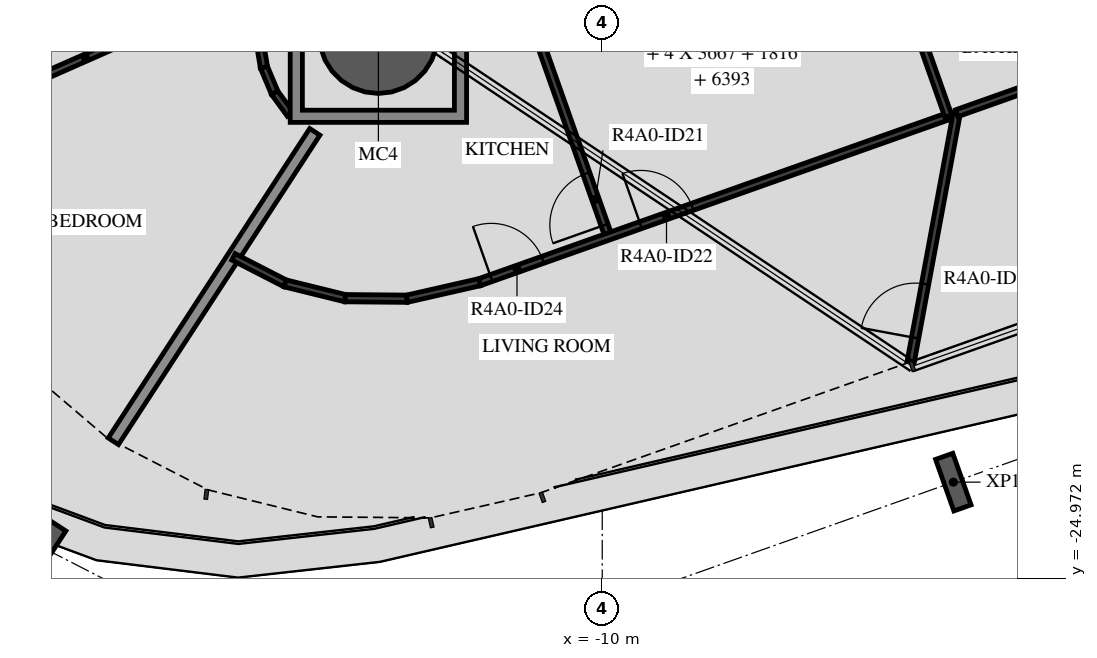
"""IFC4 building model, lengths in metres.
Left out: names, types, materials, properties, quantities, classifications, styles, units other than length and angle.
Written with IfcOpenShell. Run it as: python <this file> out.ifc"""

import sys

from ifc_helpers import new_model, si_unit, direction, frame, frame_2d, origin, origin_2d, place, context, subcontext, project, spatial, polyline, rectangle, hollow_circle, i_section, outline, extrude, element, fill, save


model = new_model("IFC4")
c1 = context("Model", 3, precision=1e-05, world=origin(), true_north=direction((0.0, 1.0)))
c2 = subcontext(c1, "Body", "Model", "MODEL_VIEW")
j1 = project(units=[si_unit("LENGTHUNIT", "METRE"), si_unit("PLANEANGLEUNIT", "RADIAN")], contexts=[c1])
p1 = place(None, origin())
s1 = spatial("IfcSite", under=j1, at=p1, CompositionType="ELEMENT")
p2 = place(p1, origin())
s2 = spatial("IfcBuilding", under=s1, at=p2, CompositionType="ELEMENT")
p3 = place(p2, frame((0.0, 0.0, 151.7)))
s3 = spatial("IfcBuildingStorey", under=s2, at=p3, CompositionType="ELEMENT", Elevation=151.7)
p4 = place(p3, frame((-13.681, -16.019, -0.45), z_axis=(0.0, 0.0, 1.0), x_axis=(1.0, 0.0, 0.0)))
e1 = element("IfcColumn", 1, at=p4, inside=s3, PredefinedType="COLUMN", context=c2, shape_type="SweptSolid", body=[
    extrude(hollow_circle(Radius=0.975, WallThickness=0.045, at=origin_2d()), origin(), (0.0, 0.0, 1.0), 3.57),
])
for number, where, z_axis, x_axis in (
    (2, (-19.192, -24.483, -0.45), (0.0, 0.0, 1.0), (-0.838, 0.546, 0.0)),
    (3, (-4.226, -23.385, -0.45), (0.0, 0.0, 1.0), (-0.943, -0.334, 0.0)),
):
    element("IfcColumn", number, at=place(p3, frame(where, z_axis=z_axis, x_axis=x_axis)), inside=s3, PredefinedType="COLUMN", context=c2, shape_type="SweptSolid", body=[
        extrude(i_section(OverallWidth=0.3, OverallDepth=0.9, WebThickness=0.019, FlangeThickness=0.035, FilletRadius=0.03, at=origin_2d()), origin(), (0.0, 0.0, 1.0), 3.57),
    ])
p5 = place(p3, frame((-18.04, -22.713, 0.0), z_axis=(0.0, 0.0, 1.0), x_axis=(0.545629831617, 0.83802630439, 0.0)))
e4 = element("IfcWall", 4, at=p5, inside=s3, PredefinedType="STANDARD", context=c2, shape_type="SweptSolid", body=[
    extrude(rectangle(XDim=6.072, YDim=0.2, at=frame_2d((3.036, 0.0))), origin(), (0.0, 0.0, 1.0), 2.73),
])
p6 = place(p3, frame((-21.455, -17.71, 0.0), z_axis=(0.0, 0.0, 1.0), x_axis=(0.914829518237, 0.403840256243, 0.0)))
e5 = element("IfcWall", 5, at=p6, inside=s3, PredefinedType="PARTITIONING", context=c2, shape_type="SweptSolid", body=[
    extrude(rectangle(XDim=6.459, YDim=0.12, at=frame_2d((3.23, 0.0))), origin(), (0.0, 0.0, 1.0), 2.73),
])
p7 = place(p6, frame((0.2, 0.0, 0.0)))
e6 = element("IfcOpeningElement", 6, at=p7, cuts=e5, PredefinedType="OPENING", context=c2, shape_type="SweptSolid", body=[
    extrude(rectangle(XDim=0.9, YDim=2.1, at=frame_2d((0.45, 1.05))), frame((0.0, 0.07, 0.0), z_axis=(0.0, -1.0, 0.0), x_axis=(1.0, 0.0, 0.0)), (0.0, 0.0, 1.0), 0.14),
])
for number, where, z_axis, x_axis in (
    (7, (-15.638, -16.115, 0.0), (0.0, 0.0, 1.0), (0.165, -0.986, 0.0)),
    (8, (-15.563, -16.564, 0.0), (0.0, 0.0, 1.0), (0.389, -0.921, 0.0)),
):
    element("IfcWall", number, at=place(p3, frame(where, z_axis=z_axis, x_axis=x_axis)), inside=s3, PredefinedType="PARTITIONING", context=c2, shape_type="SweptSolid", body=[
        extrude(rectangle(XDim=0.455, YDim=0.12, at=frame_2d((0.228, 0.0))), origin(), (0.0, 0.0, 1.0), 3.12),
    ])
p8 = place(p3, frame((-15.386, -16.983, 0.0), z_axis=(0.0, 0.0, 1.0), x_axis=(0.590016589342, -0.807391122258, 0.0)))
e9 = element("IfcWall", 9, at=p8, inside=s3, PredefinedType="PARTITIONING", context=c2, shape_type="SweptSolid", body=[
    extrude(rectangle(XDim=0.432, YDim=0.12, at=frame_2d((0.216, 0.0))), origin(), (0.0, 0.0, 1.0), 3.12),
])
p9 = place(p3, frame((-9.895, -19.346, 0.0), z_axis=(0.0, 0.0, 1.0), x_axis=(-0.333781129158, 0.942650602195, 0.0)))
e10 = element("IfcWall", 10, at=p9, inside=s3, PredefinedType="PARTITIONING", context=c2, shape_type="SweptSolid", body=[
    extrude(rectangle(XDim=5.819, YDim=0.12, at=frame_2d((2.91, 0.0))), origin(), (0.0, 0.0, 1.0), 3.12),
])
p10 = place(p9, frame((0.2, 0.0, 0.0)))
e11 = element("IfcOpeningElement", 11, at=p10, cuts=e10, PredefinedType="OPENING", context=c2, shape_type="SweptSolid", body=[
    extrude(rectangle(XDim=0.9, YDim=2.1, at=frame_2d((0.45, 1.05))), frame((0.0, 0.07, 0.0), z_axis=(0.0, -1.0, 0.0), x_axis=(1.0, 0.0, 0.0)), (0.0, 0.0, 1.0), 0.14),
])
p11 = place(p3, frame((-16.065, -19.68, 0.0), z_axis=(0.0, 0.0, 1.0), x_axis=(0.889684645268, -0.456575549033, 0.0)))
e12 = element("IfcWall", 12, at=p11, inside=s3, PredefinedType="PARTITIONING", context=c2, shape_type="SweptSolid", body=[
    extrude(rectangle(XDim=0.957, YDim=0.12, at=frame_2d((0.479, 0.0))), origin(), (0.0, 0.0, 1.0), 3.12),
])
p12 = place(p3, frame((-15.214, -20.117, 0.0), z_axis=(0.0, 0.0, 1.0), x_axis=(0.970998575146, -0.239085271534, 0.0)))
e13 = element("IfcWall", 13, at=p12, inside=s3, PredefinedType="PARTITIONING", context=c2, shape_type="SweptSolid", body=[
    extrude(rectangle(XDim=1.016, YDim=0.12, at=frame_2d((0.508, 0.0))), origin(), (0.0, 0.0, 1.0), 3.12),
])
p13 = place(p3, frame((-14.227, -20.36, 0.0), z_axis=(0.0, 0.0, 1.0), x_axis=(0.999960467683, -0.008891741722, 0.0)))
e14 = element("IfcWall", 14, at=p13, inside=s3, PredefinedType="PARTITIONING", context=c2, shape_type="SweptSolid", body=[
    extrude(rectangle(XDim=1.016, YDim=0.12, at=frame_2d((0.508, 0.0))), origin(), (0.0, 0.0, 1.0), 3.12),
])
p14 = place(p3, frame((-13.211, -20.369, 0.0), z_axis=(0.0, 0.0, 1.0), x_axis=(0.974997834831, 0.222214360642, 0.0)))
e15 = element("IfcWall", 15, at=p14, inside=s3, PredefinedType="PARTITIONING", context=c2, shape_type="SweptSolid", body=[
    extrude(rectangle(XDim=1.227, YDim=0.12, at=frame_2d((0.614, 0.0))), origin(), (0.0, 0.0, 1.0), 3.12),
])
p15 = place(p3, frame((-12.015, -20.096, 0.0), z_axis=(0.0, 0.0, 1.0), x_axis=(0.942638718556, 0.333814688531, 0.0)))
e16 = element("IfcWall", 16, at=p15, inside=s3, PredefinedType="PARTITIONING", context=c2, shape_type="SweptSolid", body=[
    extrude(rectangle(XDim=8.216, YDim=0.12, at=frame_2d((4.108, 0.0))), origin(), (0.0, 0.0, 1.0), 3.12),
])
p16 = place(p15, frame((2.809, 0.0, 0.0)))
e17 = element("IfcOpeningElement", 17, at=p16, cuts=e16, PredefinedType="OPENING", context=c2, shape_type="SweptSolid", body=[
    extrude(rectangle(XDim=0.9, YDim=2.1, at=frame_2d((0.45, 1.05))), frame((0.0, 0.07, 0.0), z_axis=(0.0, -1.0, 0.0), x_axis=(1.0, 0.0, 0.0)), (0.0, 0.0, 1.0), 0.14),
])
p17 = place(p15, frame((0.2, 0.0, 0.0)))
e18 = element("IfcOpeningElement", 18, at=p17, cuts=e16, PredefinedType="OPENING", context=c2, shape_type="SweptSolid", body=[
    extrude(rectangle(XDim=0.9, YDim=2.1, at=frame_2d((0.45, 1.05))), frame((0.0, 0.07, 0.0), z_axis=(0.0, -1.0, 0.0), x_axis=(1.0, 0.0, 0.0)), (0.0, 0.0, 1.0), 0.14),
])
p18 = place(p3, frame((-4.308, -17.367, 0.0), z_axis=(0.0, 0.0, 1.0), x_axis=(-0.333802202677, 0.942643140052, 0.0)))
e19 = element("IfcWall", 19, at=p18, inside=s3, PredefinedType="PARTITIONING", context=c2, shape_type="SweptSolid", body=[
    extrude(rectangle(XDim=3.419, YDim=0.12, at=frame_2d((1.709, 0.0))), origin(), (0.0, 0.0, 1.0), 3.12),
])
p19 = place(p3, frame((-4.927, -21.406, 0.0), z_axis=(0.0, 0.0, 1.0), x_axis=(0.182238575099, 0.983254342348, 0.0)))
e20 = element("IfcWall", 20, at=p19, inside=s3, PredefinedType="PARTITIONING", context=c2, shape_type="SweptSolid", body=[
    extrude(rectangle(XDim=4.157, YDim=0.12, at=frame_2d((2.079, 0.0))), origin(), (0.0, 0.0, 1.0), 3.12),
])
p20 = place(p19, frame((0.4, 0.0, 0.0)))
e21 = element("IfcOpeningElement", 21, at=p20, cuts=e20, PredefinedType="OPENING", context=c2, shape_type="SweptSolid", body=[
    extrude(rectangle(XDim=0.9, YDim=2.1, at=frame_2d((0.45, 1.05))), frame((0.0, 0.07, 0.0), z_axis=(0.0, -1.0, 0.0), x_axis=(1.0, 0.0, 0.0)), (0.0, 0.0, 1.0), 0.14),
])
p21 = place(p3, frame((-4.17, -17.318, 0.0), z_axis=(0.0, 0.0, 1.0), x_axis=(0.942641343532, 0.333807275931, 0.0)))
e22 = element("IfcWall", 22, at=p21, inside=s3, PredefinedType="PARTITIONING", context=c2, shape_type="SweptSolid", body=[
    extrude(rectangle(XDim=5.781, YDim=0.12, at=frame_2d((2.891, 0.0))), origin(), (0.0, 0.0, 1.0), 3.12),
])
p22 = place(p3, origin())
e23 = element("IfcWall", 23, at=p22, inside=s3, PredefinedType="STANDARD", context=c2, shape_type="SweptSolid", body=[
    extrude(outline(polyline([(-12.231, -14.569), (-12.231, -17.469), (-15.131, -17.469), (-15.131, -14.569), (-12.231, -14.569)]), holes=[polyline([(-14.931, -17.269), (-12.431, -17.269), (-12.431, -14.769), (-14.931, -14.769), (-14.931, -17.269)])]), origin(), (0.0, 0.0, 1.0), 3.12),
])
p23 = place(p10, origin())
e24 = element("IfcDoor", 24, at=p23, inside=s3, OperationType="SINGLE_SWING_LEFT", PredefinedType="DOOR", context=c2, shape_type="SweptSolid", body=[
    extrude(rectangle(XDim=0.9, YDim=2.1, at=frame_2d((0.45, 1.05))), frame((0.0, 0.025, 0.0), z_axis=(0.0, -1.0, 0.0), x_axis=(1.0, 0.0, 0.0)), (0.0, 0.0, 1.0), 0.05),
])
fill(e11, e24)
p24 = place(p16, origin())
e25 = element("IfcDoor", 25, at=p24, inside=s3, OperationType="SINGLE_SWING_LEFT", PredefinedType="DOOR", context=c2, shape_type="SweptSolid", body=[
    extrude(rectangle(XDim=0.9, YDim=2.1, at=frame_2d((0.45, 1.05))), frame((0.0, 0.025, 0.0), z_axis=(0.0, -1.0, 0.0), x_axis=(1.0, 0.0, 0.0)), (0.0, 0.0, 1.0), 0.05),
])
fill(e17, e25)
p25 = place(p20, origin())
e26 = element("IfcDoor", 26, at=p25, inside=s3, OperationType="SINGLE_SWING_RIGHT", PredefinedType="DOOR", context=c2, shape_type="SweptSolid", body=[
    extrude(rectangle(XDim=0.9, YDim=2.1, at=frame_2d((0.45, 1.05))), frame((0.0, 0.025, 0.0), z_axis=(0.0, -1.0, 0.0), x_axis=(1.0, 0.0, 0.0)), (0.0, 0.0, 1.0), 0.05),
])
fill(e21, e26)
p26 = place(p17, origin())
e27 = element("IfcDoor", 27, at=p26, inside=s3, OperationType="SINGLE_SWING_LEFT", PredefinedType="DOOR", context=c2, shape_type="SweptSolid", body=[
    extrude(rectangle(XDim=0.9, YDim=2.1, at=frame_2d((0.45, 1.05))), frame((0.0, 0.025, 0.0), z_axis=(0.0, -1.0, 0.0), x_axis=(1.0, 0.0, 0.0)), (0.0, 0.0, 1.0), 0.05),
])
fill(e18, e27)
save(model, sys.argv[1])
